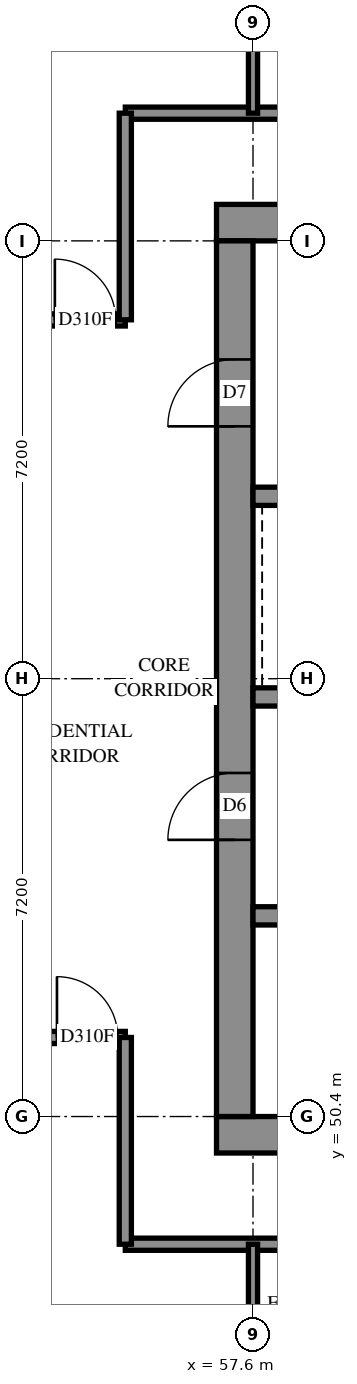
"""IFC4 building model, lengths in metres.
Left out: names, types, materials, properties, quantities, classifications, styles, units other than length and angle.
Written with IfcOpenShell. Run it as: python <this file> out.ifc"""

import sys

from ifc_helpers import new_model, si_unit, direction, frame, frame_2d, origin, place, context, subcontext, project, spatial, rectangle, extrude, element, fill, save


model = new_model("IFC4")
c1 = context("Model", 3, precision=1e-05, world=origin(), true_north=direction((0.0, 1.0)))
c2 = subcontext(c1, "Body", "Model", "MODEL_VIEW")
j1 = project(units=[si_unit("LENGTHUNIT", "METRE"), si_unit("PLANEANGLEUNIT", "RADIAN")], contexts=[c1])
p1 = place(None, origin())
s1 = spatial("IfcSite", under=j1, at=p1, CompositionType="ELEMENT")
p2 = place(p1, origin())
s2 = spatial("IfcBuilding", under=s1, at=p2, CompositionType="ELEMENT")
p3 = place(p2, frame((0.0, 0.0, 152.4)))
s3 = spatial("IfcBuildingStorey", under=s2, at=p3, CompositionType="ELEMENT", Elevation=152.4)
p4 = place(p3, frame((57.0, 50.1, -0.3), z_axis=(0.0, 0.0, 1.0), x_axis=(1.0, 0.0, 0.0)))
e1 = element("IfcWall", 1, at=p4, inside=s3, PredefinedType="SHEAR", context=c2, shape_type="SweptSolid", body=[
    extrude(rectangle(XDim=15.6, YDim=0.6, at=frame_2d((7.8, 0.0))), origin(), (0.0, 0.0, 1.0), 2.7),
])
p5 = place(p3, frame((57.0, 65.1, -0.3), z_axis=(0.0, 0.0, 1.0), x_axis=(1.0, 0.0, 0.0)))
e2 = element("IfcWall", 2, at=p5, inside=s3, PredefinedType="SHEAR", context=c2, shape_type="SweptSolid", body=[
    extrude(rectangle(XDim=15.6, YDim=0.6, at=frame_2d((7.8, 0.0))), origin(), (0.0, 0.0, 1.0), 2.7),
])
p6 = place(p5, frame((10.6, 0.0, 0.3)))
e3 = element("IfcOpeningElement", 3, at=p6, cuts=e2, PredefinedType="OPENING", context=c2, shape_type="SweptSolid", body=[
    extrude(rectangle(XDim=0.8, YDim=2.1, at=frame_2d((0.4, 1.05))), frame((0.0, 0.31, 0.0), z_axis=(0.0, -1.0, 0.0), x_axis=(1.0, 0.0, 0.0)), (0.0, 0.0, 1.0), 0.62),
])
p7 = place(p3, frame((57.3, 50.4, -0.3), z_axis=(0.0, 0.0, 1.0), x_axis=(0.0, 1.0, 0.0)))
e4 = element("IfcWall", 4, at=p7, inside=s3, PredefinedType="SHEAR", context=c2, shape_type="SweptSolid", body=[
    extrude(rectangle(XDim=14.4, YDim=0.6, at=frame_2d((7.2, 0.0))), origin(), (0.0, 0.0, 1.0), 2.7),
])
p8 = place(p7, frame((4.55, 0.0, 0.3)))
e5 = element("IfcOpeningElement", 5, at=p8, cuts=e4, PredefinedType="OPENING", context=c2, shape_type="SweptSolid", body=[
    extrude(rectangle(XDim=1.1, YDim=2.1, at=frame_2d((0.55, 1.05))), frame((0.0, 0.31, 0.0), z_axis=(0.0, -1.0, 0.0), x_axis=(1.0, 0.0, 0.0)), (0.0, 0.0, 1.0), 0.62),
])
p9 = place(p7, frame((11.35, 0.0, 0.3)))
e6 = element("IfcOpeningElement", 6, at=p9, cuts=e4, PredefinedType="OPENING", context=c2, shape_type="SweptSolid", body=[
    extrude(rectangle(XDim=1.1, YDim=2.1, at=frame_2d((0.55, 1.05))), frame((0.0, 0.31, 0.0), z_axis=(0.0, -1.0, 0.0), x_axis=(1.0, 0.0, 0.0)), (0.0, 0.0, 1.0), 0.62),
])
p10 = place(p3, frame((57.6, 53.7, 0.0), z_axis=(0.0, 0.0, 1.0), x_axis=(1.0, 0.0, 0.0)))
e7 = element("IfcWall", 7, at=p10, inside=s3, PredefinedType="SOLIDWALL", context=c2, shape_type="SweptSolid", body=[
    extrude(rectangle(XDim=14.4, YDim=0.3, at=frame_2d((7.2, 0.0))), origin(), (0.0, 0.0, 1.0), 3.1),
])
p11 = place(p10, frame((1.35, 0.0, 0.0)))
e8 = element("IfcOpeningElement", 8, at=p11, cuts=e7, PredefinedType="OPENING", context=c2, shape_type="SweptSolid", body=[
    extrude(rectangle(XDim=0.9, YDim=2.1, at=frame_2d((0.45, 1.05))), frame((0.0, 0.16, 0.0), z_axis=(0.0, -1.0, 0.0), x_axis=(1.0, 0.0, 0.0)), (0.0, 0.0, 1.0), 0.32),
])
p12 = place(p10, frame((4.95, 0.0, 0.0)))
e9 = element("IfcOpeningElement", 9, at=p12, cuts=e7, PredefinedType="OPENING", context=c2, shape_type="SweptSolid", body=[
    extrude(rectangle(XDim=0.9, YDim=2.1, at=frame_2d((0.45, 1.05))), frame((0.0, 0.16, 0.0), z_axis=(0.0, -1.0, 0.0), x_axis=(1.0, 0.0, 0.0)), (0.0, 0.0, 1.0), 0.32),
])
p13 = place(p10, frame((8.55, 0.0, 0.0)))
e10 = element("IfcOpeningElement", 10, at=p13, cuts=e7, PredefinedType="OPENING", context=c2, shape_type="SweptSolid", body=[
    extrude(rectangle(XDim=0.9, YDim=2.1, at=frame_2d((0.45, 1.05))), frame((0.0, 0.16, 0.0), z_axis=(0.0, -1.0, 0.0), x_axis=(1.0, 0.0, 0.0)), (0.0, 0.0, 1.0), 0.32),
])
p14 = place(p10, frame((12.05, 0.0, 0.0)))
e11 = element("IfcOpeningElement", 11, at=p14, cuts=e7, PredefinedType="OPENING", context=c2, shape_type="SweptSolid", body=[
    extrude(rectangle(XDim=1.1, YDim=2.1, at=frame_2d((0.55, 1.05))), frame((0.0, 0.16, 0.0), z_axis=(0.0, -1.0, 0.0), x_axis=(1.0, 0.0, 0.0)), (0.0, 0.0, 1.0), 0.32),
])
p15 = place(p3, frame((57.6, 57.3, 0.0), z_axis=(0.0, 0.0, 1.0), x_axis=(1.0, 0.0, 0.0)))
e12 = element("IfcWall", 12, at=p15, inside=s3, PredefinedType="SOLIDWALL", context=c2, shape_type="SweptSolid", body=[
    extrude(rectangle(XDim=14.4, YDim=0.3, at=frame_2d((7.2, 0.0))), origin(), (0.0, 0.0, 1.0), 3.1),
])
p16 = place(p15, frame((1.25, 0.0, 0.0)))
e13 = element("IfcOpeningElement", 13, at=p16, cuts=e12, PredefinedType="OPENING", context=c2, shape_type="SweptSolid", body=[
    extrude(rectangle(XDim=1.1, YDim=2.1, at=frame_2d((0.55, 1.05))), frame((0.0, 0.16, 0.0), z_axis=(0.0, -1.0, 0.0), x_axis=(1.0, 0.0, 0.0)), (0.0, 0.0, 1.0), 0.32),
])
p17 = place(p15, frame((4.85, 0.0, 0.0)))
e14 = element("IfcOpeningElement", 14, at=p17, cuts=e12, PredefinedType="OPENING", context=c2, shape_type="SweptSolid", body=[
    extrude(rectangle(XDim=1.1, YDim=2.1, at=frame_2d((0.55, 1.05))), frame((0.0, 0.16, 0.0), z_axis=(0.0, -1.0, 0.0), x_axis=(1.0, 0.0, 0.0)), (0.0, 0.0, 1.0), 0.32),
])
p18 = place(p15, frame((8.45, 0.0, 0.0)))
e15 = element("IfcOpeningElement", 15, at=p18, cuts=e12, PredefinedType="OPENING", context=c2, shape_type="SweptSolid", body=[
    extrude(rectangle(XDim=1.1, YDim=2.1, at=frame_2d((0.55, 1.05))), frame((0.0, 0.16, 0.0), z_axis=(0.0, -1.0, 0.0), x_axis=(1.0, 0.0, 0.0)), (0.0, 0.0, 1.0), 0.32),
])
p19 = place(p15, frame((12.05, 0.0, 0.0)))
e16 = element("IfcOpeningElement", 16, at=p19, cuts=e12, PredefinedType="OPENING", context=c2, shape_type="SweptSolid", body=[
    extrude(rectangle(XDim=1.1, YDim=2.1, at=frame_2d((0.55, 1.05))), frame((0.0, 0.16, 0.0), z_axis=(0.0, -1.0, 0.0), x_axis=(1.0, 0.0, 0.0)), (0.0, 0.0, 1.0), 0.32),
])
p20 = place(p3, frame((57.6, 60.6, 0.0), z_axis=(0.0, 0.0, 1.0), x_axis=(1.0, 0.0, 0.0)))
e17 = element("IfcWall", 17, at=p20, inside=s3, PredefinedType="SOLIDWALL", context=c2, shape_type="SweptSolid", body=[
    extrude(rectangle(XDim=7.2, YDim=0.3, at=frame_2d((3.6, 0.0))), origin(), (0.0, 0.0, 1.0), 3.1),
])
p21 = place(p3, frame((55.5, 48.3, 0.0), z_axis=(0.0, 0.0, 1.0), x_axis=(1.0, 0.0, 0.0)))
e18 = element("IfcWall", 18, at=p21, inside=s3, PredefinedType="PARTITIONING", context=c2, shape_type="SweptSolid", body=[
    extrude(rectangle(XDim=18.974, YDim=0.2, at=frame_2d((9.487, 0.0))), origin(), (0.0, 0.0, 1.0), 3.1),
])
p22 = place(p21, frame((4.4, 0.0, 0.0)))
e19 = element("IfcOpeningElement", 19, at=p22, cuts=e18, PredefinedType="OPENING", context=c2, shape_type="SweptSolid", body=[
    extrude(rectangle(XDim=0.9, YDim=2.1, at=frame_2d((0.45, 1.05))), frame((0.0, 0.11, 0.0), z_axis=(0.0, -1.0, 0.0), x_axis=(1.0, 0.0, 0.0)), (0.0, 0.0, 1.0), 0.22),
])
p23 = place(p21, frame((6.1, 0.0, 0.0)))
e20 = element("IfcOpeningElement", 20, at=p23, cuts=e18, PredefinedType="OPENING", context=c2, shape_type="SweptSolid", body=[
    extrude(rectangle(XDim=0.9, YDim=2.1, at=frame_2d((0.45, 1.05))), frame((0.0, 0.11, 0.0), z_axis=(0.0, -1.0, 0.0), x_axis=(1.0, 0.0, 0.0)), (0.0, 0.0, 1.0), 0.22),
])
p24 = place(p21, frame((13.162, 0.0, 0.0)))
e21 = element("IfcOpeningElement", 21, at=p24, cuts=e18, PredefinedType="OPENING", context=c2, shape_type="SweptSolid", body=[
    extrude(rectangle(XDim=1.0, YDim=2.1, at=frame_2d((0.5, 1.05))), frame((0.0, 0.11, 0.0), z_axis=(0.0, -1.0, 0.0), x_axis=(1.0, 0.0, 0.0)), (0.0, 0.0, 1.0), 0.22),
])
p25 = place(p3, frame((55.5, 66.9, 0.0), z_axis=(0.0, 0.0, 1.0), x_axis=(1.0, 0.0, 0.0)))
e22 = element("IfcWall", 22, at=p25, inside=s3, PredefinedType="PARTITIONING", context=c2, shape_type="SweptSolid", body=[
    extrude(rectangle(XDim=18.6, YDim=0.2, at=frame_2d((9.3, 0.0))), origin(), (0.0, 0.0, 1.0), 3.1),
])
p26 = place(p25, frame((4.4, 0.0, 0.0)))
e23 = element("IfcOpeningElement", 23, at=p26, cuts=e22, PredefinedType="OPENING", context=c2, shape_type="SweptSolid", body=[
    extrude(rectangle(XDim=0.9, YDim=2.1, at=frame_2d((0.45, 1.05))), frame((0.0, 0.11, 0.0), z_axis=(0.0, -1.0, 0.0), x_axis=(1.0, 0.0, 0.0)), (0.0, 0.0, 1.0), 0.22),
])
p27 = place(p25, frame((6.1, 0.0, 0.0)))
e24 = element("IfcOpeningElement", 24, at=p27, cuts=e22, PredefinedType="OPENING", context=c2, shape_type="SweptSolid", body=[
    extrude(rectangle(XDim=0.9, YDim=2.1, at=frame_2d((0.45, 1.05))), frame((0.0, 0.11, 0.0), z_axis=(0.0, -1.0, 0.0), x_axis=(1.0, 0.0, 0.0)), (0.0, 0.0, 1.0), 0.22),
])
p28 = place(p25, frame((11.65, 0.0, 0.0)))
e25 = element("IfcOpeningElement", 25, at=p28, cuts=e22, PredefinedType="OPENING", context=c2, shape_type="SweptSolid", body=[
    extrude(rectangle(XDim=0.9, YDim=2.1, at=frame_2d((0.45, 1.05))), frame((0.0, 0.11, 0.0), z_axis=(0.0, -1.0, 0.0), x_axis=(1.0, 0.0, 0.0)), (0.0, 0.0, 1.0), 0.22),
])
p29 = place(p25, frame((13.3, 0.0, 0.0)))
e26 = element("IfcOpeningElement", 26, at=p29, cuts=e22, PredefinedType="OPENING", context=c2, shape_type="SweptSolid", body=[
    extrude(rectangle(XDim=0.9, YDim=2.1, at=frame_2d((0.45, 1.05))), frame((0.0, 0.11, 0.0), z_axis=(0.0, -1.0, 0.0), x_axis=(1.0, 0.0, 0.0)), (0.0, 0.0, 1.0), 0.22),
])
p30 = place(p3, frame((50.4, 51.7, 0.0), z_axis=(0.0, 0.0, 1.0), x_axis=(1.0, 0.0, 0.0)))
e27 = element("IfcWall", 27, at=p30, inside=s3, PredefinedType="PARTITIONING", context=c2, shape_type="SweptSolid", body=[
    extrude(rectangle(XDim=5.1, YDim=0.2, at=frame_2d((2.55, 0.0))), origin(), (0.0, 0.0, 1.0), 3.1),
])
p31 = place(p30, frame((0.552, 0.0, 0.0)))
e28 = element("IfcOpeningElement", 28, at=p31, cuts=e27, PredefinedType="OPENING", context=c2, shape_type="SweptSolid", body=[
    extrude(rectangle(XDim=0.9, YDim=2.1, at=frame_2d((0.45, 1.05))), frame((0.0, 0.11, 0.0), z_axis=(0.0, -1.0, 0.0), x_axis=(1.0, 0.0, 0.0)), (0.0, 0.0, 1.0), 0.22),
])
p32 = place(p30, frame((3.976, 0.0, 0.0)))
e29 = element("IfcOpeningElement", 29, at=p32, cuts=e27, PredefinedType="OPENING", context=c2, shape_type="SweptSolid", body=[
    extrude(rectangle(XDim=1.0, YDim=2.1, at=frame_2d((0.5, 1.05))), frame((0.0, 0.11, 0.0), z_axis=(0.0, -1.0, 0.0), x_axis=(1.0, 0.0, 0.0)), (0.0, 0.0, 1.0), 0.22),
])
p33 = place(p3, frame((50.4, 63.5, 0.0), z_axis=(0.0, 0.0, 1.0), x_axis=(1.0, 0.0, 0.0)))
e30 = element("IfcWall", 30, at=p33, inside=s3, PredefinedType="PARTITIONING", context=c2, shape_type="SweptSolid", body=[
    extrude(rectangle(XDim=5.1, YDim=0.2, at=frame_2d((2.55, 0.0))), origin(), (0.0, 0.0, 1.0), 3.1),
])
p34 = place(p33, frame((0.552, 0.0, 0.0)))
e31 = element("IfcOpeningElement", 31, at=p34, cuts=e30, PredefinedType="OPENING", context=c2, shape_type="SweptSolid", body=[
    extrude(rectangle(XDim=0.9, YDim=2.1, at=frame_2d((0.45, 1.05))), frame((0.0, 0.11, 0.0), z_axis=(0.0, -1.0, 0.0), x_axis=(1.0, 0.0, 0.0)), (0.0, 0.0, 1.0), 0.22),
])
p35 = place(p33, frame((3.941, 0.0, 0.0)))
e32 = element("IfcOpeningElement", 32, at=p35, cuts=e30, PredefinedType="OPENING", context=c2, shape_type="SweptSolid", body=[
    extrude(rectangle(XDim=1.0, YDim=2.1, at=frame_2d((0.5, 1.05))), frame((0.0, 0.11, 0.0), z_axis=(0.0, -1.0, 0.0), x_axis=(1.0, 0.0, 0.0)), (0.0, 0.0, 1.0), 0.22),
])
p36 = place(p3, frame((55.5, 48.3, 0.0), z_axis=(0.0, 0.0, 1.0), x_axis=(0.0, 1.0, 0.0)))
e33 = element("IfcWall", 33, at=p36, inside=s3, PredefinedType="PARTITIONING", context=c2, shape_type="SweptSolid", body=[
    extrude(rectangle(XDim=3.4, YDim=0.2, at=frame_2d((1.7, 0.0))), origin(), (0.0, 0.0, 1.0), 3.1),
])
p37 = place(p3, frame((55.5, 63.502, 0.0), z_axis=(0.0, 0.0, 1.0), x_axis=(0.0, 1.0, 0.0)))
e34 = element("IfcWall", 34, at=p37, inside=s3, PredefinedType="PARTITIONING", context=c2, shape_type="SweptSolid", body=[
    extrude(rectangle(XDim=3.398, YDim=0.2, at=frame_2d((1.699, 0.0))), origin(), (0.0, 0.0, 1.0), 3.1),
])
for number, where, z_axis, x_axis in (
    (35, (57.6, 45.9, 0.0), (0.0, 0.0, 1.0), (0.0, 1.0, 0.0)),
    (36, (57.6, 66.9, 0.0), (0.0, 0.0, 1.0), (0.0, 1.0, 0.0)),
):
    element("IfcWall", number, at=place(p3, frame(where, z_axis=z_axis, x_axis=x_axis)), inside=s3, PredefinedType="PARTITIONING", context=c2, shape_type="SweptSolid", body=[
        extrude(rectangle(XDim=2.4, YDim=0.15, at=frame_2d((1.2, 0.0))), origin(), (0.0, 0.0, 1.0), 3.1),
    ])
p38 = place(p8, origin())
e37 = element("IfcDoor", 37, at=p38, inside=s3, OperationType="DOUBLE_DOOR_SINGLE_SWING", PredefinedType="DOOR", context=c2, shape_type="SweptSolid", body=[
    extrude(rectangle(XDim=1.1, YDim=2.1, at=frame_2d((0.55, 1.05))), frame((0.0, 0.025, 0.0), z_axis=(0.0, -1.0, 0.0), x_axis=(1.0, 0.0, 0.0)), (0.0, 0.0, 1.0), 0.05),
])
fill(e5, e37)
p39 = place(p9, origin())
e38 = element("IfcDoor", 38, at=p39, inside=s3, OperationType="SINGLE_SWING_LEFT", PredefinedType="DOOR", context=c2, shape_type="SweptSolid", body=[
    extrude(rectangle(XDim=1.1, YDim=2.1, at=frame_2d((0.55, 1.05))), frame((0.0, 0.025, 0.0), z_axis=(0.0, -1.0, 0.0), x_axis=(1.0, 0.0, 0.0)), (0.0, 0.0, 1.0), 0.05),
])
fill(e6, e38)
p40 = place(p35, origin())
e39 = element("IfcDoor", 39, at=p40, inside=s3, OperationType="SINGLE_SWING_LEFT", PredefinedType="DOOR", context=c2, shape_type="SweptSolid", body=[
    extrude(rectangle(XDim=1.0, YDim=2.1, at=frame_2d((0.5, 1.05))), frame((0.0, 0.025, 0.0), z_axis=(0.0, -1.0, 0.0), x_axis=(1.0, 0.0, 0.0)), (0.0, 0.0, 1.0), 0.05),
])
fill(e32, e39)
p41 = place(p32, origin())
e40 = element("IfcDoor", 40, at=p41, inside=s3, OperationType="SINGLE_SWING_RIGHT", PredefinedType="DOOR", context=c2, shape_type="SweptSolid", body=[
    extrude(rectangle(XDim=1.0, YDim=2.1, at=frame_2d((0.5, 1.05))), frame((0.0, 0.025, 0.0), z_axis=(0.0, -1.0, 0.0), x_axis=(1.0, 0.0, 0.0)), (0.0, 0.0, 1.0), 0.05),
])
fill(e29, e40)
save(model, sys.argv[1])
